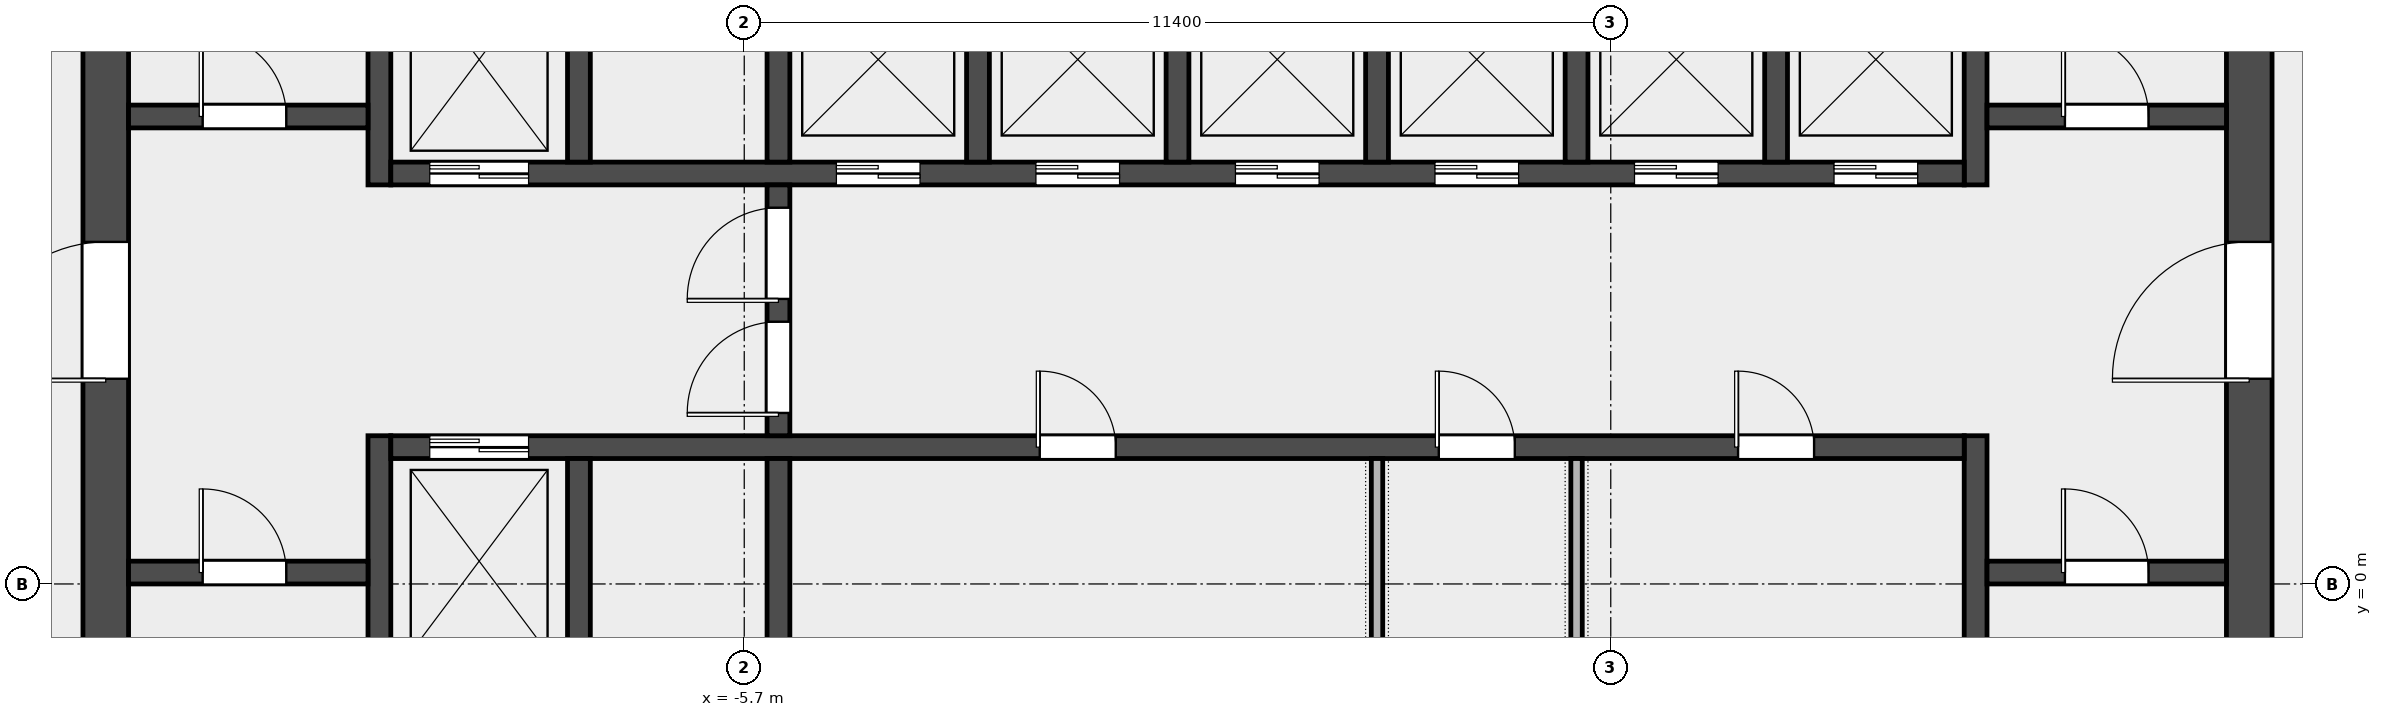
"""IFC4 building model, lengths in metres.
Left out: names, types, materials, properties, quantities, classifications, styles, units other than length and angle.
Written with IfcOpenShell. Run it as: python <this file> out.ifc"""

import sys

from ifc_helpers import new_model, si_unit, direction, frame, frame_2d, origin, place, context, subcontext, project, spatial, rectangle, extrude, element, fill, save


model = new_model("IFC4")
c1 = context("Model", 3, precision=1e-05, world=origin(), true_north=direction((0.0, 1.0)))
c2 = subcontext(c1, "Body", "Model", "MODEL_VIEW")
j1 = project(units=[si_unit("LENGTHUNIT", "METRE"), si_unit("PLANEANGLEUNIT", "RADIAN")], contexts=[c1])
p1 = place(None, origin())
s1 = spatial("IfcSite", under=j1, at=p1, CompositionType="ELEMENT")
p2 = place(p1, origin())
s2 = spatial("IfcBuilding", under=s1, at=p2, CompositionType="ELEMENT")
p3 = place(p2, frame((0.0, 0.0, 337.4)))
s3 = spatial("IfcBuildingStorey", under=s2, at=p3, CompositionType="ELEMENT", Elevation=337.4)
p4 = place(p3, frame((-14.1, -6.6, 0.0), z_axis=(0.0, 0.0, 1.0), x_axis=(0.0, 1.0, 0.0)))
e1 = element("IfcWall", 1, at=p4, inside=s3, PredefinedType="SHEAR", context=c2, shape_type="SweptSolid", body=[
    extrude(rectangle(XDim=19.5, YDim=0.6, at=frame_2d((9.75, 0.0))), origin(), (0.0, 0.0, 1.0), 7.7),
])
p5 = place(p4, frame((9.3, 0.0, 0.0)))
e2 = element("IfcOpeningElement", 2, at=p5, cuts=e1, PredefinedType="OPENING", context=c2, shape_type="SweptSolid", body=[
    extrude(rectangle(XDim=1.8, YDim=2.1, at=frame_2d((0.9, 1.05))), frame((0.0, 0.312, 0.0), z_axis=(0.0, -1.0, 0.0), x_axis=(1.0, 0.0, 0.0)), (0.0, 0.0, 1.0), 0.624),
])
p6 = place(p3, frame((14.1, -6.6, 0.0), z_axis=(0.0, 0.0, 1.0), x_axis=(0.0, 1.0, 0.0)))
e3 = element("IfcWall", 3, at=p6, inside=s3, PredefinedType="SHEAR", context=c2, shape_type="SweptSolid", body=[
    extrude(rectangle(XDim=19.5, YDim=0.6, at=frame_2d((9.75, 0.0))), origin(), (0.0, 0.0, 1.0), 7.7),
])
p7 = place(p6, frame((9.3, 0.0, 0.0)))
e4 = element("IfcOpeningElement", 4, at=p7, cuts=e3, PredefinedType="OPENING", context=c2, shape_type="SweptSolid", body=[
    extrude(rectangle(XDim=1.8, YDim=2.1, at=frame_2d((0.9, 1.05))), frame((0.0, 0.312, 0.0), z_axis=(0.0, -1.0, 0.0), x_axis=(1.0, 0.0, 0.0)), (0.0, 0.0, 1.0), 0.624),
])
p8 = place(p3, frame((-10.5, -6.6, 0.0), z_axis=(0.0, 0.0, 1.0), x_axis=(0.0, 1.0, 0.0)))
e5 = element("IfcWall", 5, at=p8, inside=s3, PredefinedType="SHEAR", context=c2, shape_type="SweptSolid", body=[
    extrude(rectangle(XDim=8.55, YDim=0.3, at=frame_2d((4.275, 0.0))), origin(), (0.0, 0.0, 1.0), 7.7),
])
p9 = place(p3, frame((-10.5, 5.25, 0.0), z_axis=(0.0, 0.0, 1.0), x_axis=(0.0, 1.0, 0.0)))
e6 = element("IfcWall", 6, at=p9, inside=s3, PredefinedType="SHEAR", context=c2, shape_type="SweptSolid", body=[
    extrude(rectangle(XDim=7.65, YDim=0.3, at=frame_2d((3.825, 0.0))), origin(), (0.0, 0.0, 1.0), 7.7),
])
p10 = place(p3, frame((10.5, -6.6, 0.0), z_axis=(0.0, 0.0, 1.0), x_axis=(0.0, 1.0, 0.0)))
e7 = element("IfcWall", 7, at=p10, inside=s3, PredefinedType="SHEAR", context=c2, shape_type="SweptSolid", body=[
    extrude(rectangle(XDim=8.55, YDim=0.3, at=frame_2d((4.275, 0.0))), origin(), (0.0, 0.0, 1.0), 7.7),
])
p11 = place(p3, frame((10.5, 5.25, 0.0), z_axis=(0.0, 0.0, 1.0), x_axis=(0.0, 1.0, 0.0)))
e8 = element("IfcWall", 8, at=p11, inside=s3, PredefinedType="SHEAR", context=c2, shape_type="SweptSolid", body=[
    extrude(rectangle(XDim=7.65, YDim=0.3, at=frame_2d((3.825, 0.0))), origin(), (0.0, 0.0, 1.0), 7.7),
])
p12 = place(p3, frame((-13.8, 0.15, 0.0), z_axis=(0.0, 0.0, 1.0), x_axis=(1.0, 0.0, 0.0)))
e9 = element("IfcWall", 9, at=p12, inside=s3, PredefinedType="SOLIDWALL", context=c2, shape_type="SweptSolid", body=[
    extrude(rectangle(XDim=3.15, YDim=0.3, at=frame_2d((1.575, 0.0))), origin(), (0.0, 0.0, 1.0), 7.7),
])
p13 = place(p12, frame((0.975, 0.0, 0.0)))
e10 = element("IfcOpeningElement", 10, at=p13, cuts=e9, PredefinedType="OPENING", context=c2, shape_type="SweptSolid", body=[
    extrude(rectangle(XDim=1.1, YDim=2.1, at=frame_2d((0.55, 1.05))), frame((0.0, 0.162, 0.0), z_axis=(0.0, -1.0, 0.0), x_axis=(1.0, 0.0, 0.0)), (0.0, 0.0, 1.0), 0.324),
])
p14 = place(p3, frame((-13.8, 6.15, 0.0), z_axis=(0.0, 0.0, 1.0), x_axis=(1.0, 0.0, 0.0)))
e11 = element("IfcWall", 11, at=p14, inside=s3, PredefinedType="SOLIDWALL", context=c2, shape_type="SweptSolid", body=[
    extrude(rectangle(XDim=3.15, YDim=0.3, at=frame_2d((1.575, 0.0))), origin(), (0.0, 0.0, 1.0), 7.7),
])
p15 = place(p14, frame((0.975, 0.0, 0.0)))
e12 = element("IfcOpeningElement", 12, at=p15, cuts=e11, PredefinedType="OPENING", context=c2, shape_type="SweptSolid", body=[
    extrude(rectangle(XDim=1.1, YDim=2.1, at=frame_2d((0.55, 1.05))), frame((0.0, 0.162, 0.0), z_axis=(0.0, -1.0, 0.0), x_axis=(1.0, 0.0, 0.0)), (0.0, 0.0, 1.0), 0.324),
])
p16 = place(p3, frame((10.65, 0.15, 0.0), z_axis=(0.0, 0.0, 1.0), x_axis=(1.0, 0.0, 0.0)))
e13 = element("IfcWall", 13, at=p16, inside=s3, PredefinedType="SOLIDWALL", context=c2, shape_type="SweptSolid", body=[
    extrude(rectangle(XDim=3.15, YDim=0.3, at=frame_2d((1.575, 0.0))), origin(), (0.0, 0.0, 1.0), 7.7),
])
p17 = place(p16, frame((1.025, 0.0, 0.0)))
e14 = element("IfcOpeningElement", 14, at=p17, cuts=e13, PredefinedType="OPENING", context=c2, shape_type="SweptSolid", body=[
    extrude(rectangle(XDim=1.1, YDim=2.1, at=frame_2d((0.55, 1.05))), frame((0.0, 0.162, 0.0), z_axis=(0.0, -1.0, 0.0), x_axis=(1.0, 0.0, 0.0)), (0.0, 0.0, 1.0), 0.324),
])
p18 = place(p3, frame((10.65, 6.15, 0.0), z_axis=(0.0, 0.0, 1.0), x_axis=(1.0, 0.0, 0.0)))
e15 = element("IfcWall", 15, at=p18, inside=s3, PredefinedType="SOLIDWALL", context=c2, shape_type="SweptSolid", body=[
    extrude(rectangle(XDim=3.15, YDim=0.3, at=frame_2d((1.575, 0.0))), origin(), (0.0, 0.0, 1.0), 7.7),
])
p19 = place(p18, frame((1.025, 0.0, 0.0)))
e16 = element("IfcOpeningElement", 16, at=p19, cuts=e15, PredefinedType="OPENING", context=c2, shape_type="SweptSolid", body=[
    extrude(rectangle(XDim=1.1, YDim=2.1, at=frame_2d((0.55, 1.05))), frame((0.0, 0.162, 0.0), z_axis=(0.0, -1.0, 0.0), x_axis=(1.0, 0.0, 0.0)), (0.0, 0.0, 1.0), 0.324),
])
p20 = place(p3, frame((-10.35, 1.8, 0.0), z_axis=(0.0, 0.0, 1.0), x_axis=(1.0, 0.0, 0.0)))
e17 = element("IfcWall", 17, at=p20, inside=s3, PredefinedType="SOLIDWALL", context=c2, shape_type="SweptSolid", body=[
    extrude(rectangle(XDim=20.7, YDim=0.3, at=frame_2d((10.35, 0.0))), origin(), (0.0, 0.0, 1.0), 7.7),
])
p21 = place(p20, frame((0.512, 0.0, 0.0)))
e18 = element("IfcOpeningElement", 18, at=p21, cuts=e17, PredefinedType="OPENING", context=c2, shape_type="SweptSolid", body=[
    extrude(rectangle(XDim=1.3, YDim=2.1, at=frame_2d((0.65, 1.05))), frame((0.0, 0.162, 0.0), z_axis=(0.0, -1.0, 0.0), x_axis=(1.0, 0.0, 0.0)), (0.0, 0.0, 1.0), 0.324),
])
p22 = place(p20, frame((8.538, 0.0, 0.0)))
e19 = element("IfcOpeningElement", 19, at=p22, cuts=e17, PredefinedType="OPENING", context=c2, shape_type="SweptSolid", body=[
    extrude(rectangle(XDim=1.0, YDim=2.1, at=frame_2d((0.5, 1.05))), frame((0.0, 0.162, 0.0), z_axis=(0.0, -1.0, 0.0), x_axis=(1.0, 0.0, 0.0)), (0.0, 0.0, 1.0), 0.324),
])
p23 = place(p20, frame((13.788, 0.0, 0.0)))
e20 = element("IfcOpeningElement", 20, at=p23, cuts=e17, PredefinedType="OPENING", context=c2, shape_type="SweptSolid", body=[
    extrude(rectangle(XDim=1.0, YDim=2.1, at=frame_2d((0.5, 1.05))), frame((0.0, 0.162, 0.0), z_axis=(0.0, -1.0, 0.0), x_axis=(1.0, 0.0, 0.0)), (0.0, 0.0, 1.0), 0.324),
])
p24 = place(p20, frame((17.725, 0.0, 0.0)))
e21 = element("IfcOpeningElement", 21, at=p24, cuts=e17, PredefinedType="OPENING", context=c2, shape_type="SweptSolid", body=[
    extrude(rectangle(XDim=1.0, YDim=2.1, at=frame_2d((0.5, 1.05))), frame((0.0, 0.162, 0.0), z_axis=(0.0, -1.0, 0.0), x_axis=(1.0, 0.0, 0.0)), (0.0, 0.0, 1.0), 0.324),
])
p25 = place(p3, frame((-10.35, 5.4, 0.0), z_axis=(0.0, 0.0, 1.0), x_axis=(1.0, 0.0, 0.0)))
e22 = element("IfcWall", 22, at=p25, inside=s3, PredefinedType="SOLIDWALL", context=c2, shape_type="SweptSolid", body=[
    extrude(rectangle(XDim=20.7, YDim=0.3, at=frame_2d((10.35, 0.0))), origin(), (0.0, 0.0, 1.0), 7.7),
])
p26 = place(p25, frame((0.512, 0.0, 0.0)))
e23 = element("IfcOpeningElement", 23, at=p26, cuts=e22, PredefinedType="OPENING", context=c2, shape_type="SweptSolid", body=[
    extrude(rectangle(XDim=1.3, YDim=2.1, at=frame_2d((0.65, 1.05))), frame((0.0, 0.162, 0.0), z_axis=(0.0, -1.0, 0.0), x_axis=(1.0, 0.0, 0.0)), (0.0, 0.0, 1.0), 0.324),
])
p27 = place(p25, frame((5.863, 0.0, 0.0)))
e24 = element("IfcOpeningElement", 24, at=p27, cuts=e22, PredefinedType="OPENING", context=c2, shape_type="SweptSolid", body=[
    extrude(rectangle(XDim=1.1, YDim=2.1, at=frame_2d((0.55, 1.05))), frame((0.0, 0.162, 0.0), z_axis=(0.0, -1.0, 0.0), x_axis=(1.0, 0.0, 0.0)), (0.0, 0.0, 1.0), 0.324),
])
p28 = place(p25, frame((8.488, 0.0, 0.0)))
e25 = element("IfcOpeningElement", 25, at=p28, cuts=e22, PredefinedType="OPENING", context=c2, shape_type="SweptSolid", body=[
    extrude(rectangle(XDim=1.1, YDim=2.1, at=frame_2d((0.55, 1.05))), frame((0.0, 0.162, 0.0), z_axis=(0.0, -1.0, 0.0), x_axis=(1.0, 0.0, 0.0)), (0.0, 0.0, 1.0), 0.324),
])
p29 = place(p25, frame((11.113, 0.0, 0.0)))
e26 = element("IfcOpeningElement", 26, at=p29, cuts=e22, PredefinedType="OPENING", context=c2, shape_type="SweptSolid", body=[
    extrude(rectangle(XDim=1.1, YDim=2.1, at=frame_2d((0.55, 1.05))), frame((0.0, 0.162, 0.0), z_axis=(0.0, -1.0, 0.0), x_axis=(1.0, 0.0, 0.0)), (0.0, 0.0, 1.0), 0.324),
])
p30 = place(p25, frame((13.738, 0.0, 0.0)))
e27 = element("IfcOpeningElement", 27, at=p30, cuts=e22, PredefinedType="OPENING", context=c2, shape_type="SweptSolid", body=[
    extrude(rectangle(XDim=1.1, YDim=2.1, at=frame_2d((0.55, 1.05))), frame((0.0, 0.162, 0.0), z_axis=(0.0, -1.0, 0.0), x_axis=(1.0, 0.0, 0.0)), (0.0, 0.0, 1.0), 0.324),
])
p31 = place(p25, frame((16.363, 0.0, 0.0)))
e28 = element("IfcOpeningElement", 28, at=p31, cuts=e22, PredefinedType="OPENING", context=c2, shape_type="SweptSolid", body=[
    extrude(rectangle(XDim=1.1, YDim=2.1, at=frame_2d((0.55, 1.05))), frame((0.0, 0.162, 0.0), z_axis=(0.0, -1.0, 0.0), x_axis=(1.0, 0.0, 0.0)), (0.0, 0.0, 1.0), 0.324),
])
p32 = place(p25, frame((18.988, 0.0, 0.0)))
e29 = element("IfcOpeningElement", 29, at=p32, cuts=e22, PredefinedType="OPENING", context=c2, shape_type="SweptSolid", body=[
    extrude(rectangle(XDim=1.1, YDim=2.1, at=frame_2d((0.55, 1.05))), frame((0.0, 0.162, 0.0), z_axis=(0.0, -1.0, 0.0), x_axis=(1.0, 0.0, 0.0)), (0.0, 0.0, 1.0), 0.324),
])
for number, where, z_axis, x_axis in (
    (30, (-7.875, -1.05, 0.0), (0.0, 0.0, 1.0), (0.0, 1.0, 0.0)),
    (31, (-5.25, -1.05, 0.0), (0.0, 0.0, 1.0), (0.0, 1.0, 0.0)),
    (32, (-7.875, 5.55, 0.0), (0.0, 0.0, 1.0), (0.0, 1.0, 0.0)),
    (33, (-5.25, 5.55, 0.0), (0.0, 0.0, 1.0), (0.0, 1.0, 0.0)),
    (34, (-2.625, 5.55, 0.0), (0.0, 0.0, 1.0), (0.0, 1.0, 0.0)),
    (35, (0.0, 5.55, 0.0), (0.0, 0.0, 1.0), (0.0, 1.0, 0.0)),
    (36, (2.625, 5.55, 0.0), (0.0, 0.0, 1.0), (0.0, 1.0, 0.0)),
    (37, (5.25, 5.55, 0.0), (0.0, 0.0, 1.0), (0.0, 1.0, 0.0)),
    (38, (7.875, 5.55, 0.0), (0.0, 0.0, 1.0), (0.0, 1.0, 0.0)),
):
    element("IfcWall", number, at=place(p3, frame(where, z_axis=z_axis, x_axis=x_axis)), inside=s3, PredefinedType="SOLIDWALL", context=c2, shape_type="SweptSolid", body=[
        extrude(rectangle(XDim=2.7, YDim=0.3, at=frame_2d((1.35, 0.0))), origin(), (0.0, 0.0, 1.0), 7.7),
    ])
p33 = place(p3, frame((-5.25, 1.95, 0.0), z_axis=(0.0, 0.0, 1.0), x_axis=(0.0, 1.0, 0.0)))
e39 = element("IfcWall", 39, at=p33, inside=s3, PredefinedType="SOLIDWALL", context=c2, shape_type="SweptSolid", body=[
    extrude(rectangle(XDim=3.3, YDim=0.3, at=frame_2d((1.65, 0.0))), origin(), (0.0, 0.0, 1.0), 7.7),
])
p34 = place(p33, frame((0.3, 0.0, 0.0)))
e40 = element("IfcOpeningElement", 40, at=p34, cuts=e39, PredefinedType="OPENING", context=c2, shape_type="SweptSolid", body=[
    extrude(rectangle(XDim=1.2, YDim=2.1, at=frame_2d((0.6, 1.05))), frame((0.0, 0.162, 0.0), z_axis=(0.0, -1.0, 0.0), x_axis=(1.0, 0.0, 0.0)), (0.0, 0.0, 1.0), 0.324),
])
p35 = place(p33, frame((1.8, 0.0, 0.0)))
e41 = element("IfcOpeningElement", 41, at=p35, cuts=e39, PredefinedType="OPENING", context=c2, shape_type="SweptSolid", body=[
    extrude(rectangle(XDim=1.2, YDim=2.1, at=frame_2d((0.6, 1.05))), frame((0.0, 0.162, 0.0), z_axis=(0.0, -1.0, 0.0), x_axis=(1.0, 0.0, 0.0)), (0.0, 0.0, 1.0), 0.324),
])
for number, where, z_axis, x_axis in (
    (42, (2.625, -1.05, 0.0), (0.0, 0.0, 1.0), (0.0, 1.0, 0.0)),
    (43, (5.25, -1.05, 0.0), (0.0, 0.0, 1.0), (0.0, 1.0, 0.0)),
):
    element("IfcWall", number, at=place(p3, frame(where, z_axis=z_axis, x_axis=x_axis)), inside=s3, PredefinedType="PARTITIONING", context=c2, shape_type="SweptSolid", body=[
        extrude(rectangle(XDim=2.7, YDim=0.15, at=frame_2d((1.35, 0.0))), origin(), (0.0, 0.0, 1.0), 7.7),
    ])
p36 = place(p13, origin())
e44 = element("IfcDoor", 44, at=p36, inside=s3, OperationType="SINGLE_SWING_LEFT", PredefinedType="DOOR", context=c2, shape_type="SweptSolid", body=[
    extrude(rectangle(XDim=1.1, YDim=2.1, at=frame_2d((0.55, 1.05))), frame((0.0, 0.025, 0.0), z_axis=(0.0, -1.0, 0.0), x_axis=(1.0, 0.0, 0.0)), (0.0, 0.0, 1.0), 0.05),
])
fill(e10, e44)
p37 = place(p15, origin())
e45 = element("IfcDoor", 45, at=p37, inside=s3, OperationType="SINGLE_SWING_LEFT", PredefinedType="DOOR", context=c2, shape_type="SweptSolid", body=[
    extrude(rectangle(XDim=1.1, YDim=2.1, at=frame_2d((0.55, 1.05))), frame((0.0, 0.025, 0.0), z_axis=(0.0, -1.0, 0.0), x_axis=(1.0, 0.0, 0.0)), (0.0, 0.0, 1.0), 0.05),
])
fill(e12, e45)
p38 = place(p17, origin())
e46 = element("IfcDoor", 46, at=p38, inside=s3, OperationType="SINGLE_SWING_RIGHT", PredefinedType="DOOR", context=c2, shape_type="SweptSolid", body=[
    extrude(rectangle(XDim=1.1, YDim=2.1, at=frame_2d((0.55, 1.05))), frame((0.0, 0.025, 0.0), z_axis=(0.0, -1.0, 0.0), x_axis=(1.0, 0.0, 0.0)), (0.0, 0.0, 1.0), 0.05),
])
fill(e14, e46)
p39 = place(p19, origin())
e47 = element("IfcDoor", 47, at=p39, inside=s3, OperationType="SINGLE_SWING_RIGHT", PredefinedType="DOOR", context=c2, shape_type="SweptSolid", body=[
    extrude(rectangle(XDim=1.1, YDim=2.1, at=frame_2d((0.55, 1.05))), frame((0.0, 0.025, 0.0), z_axis=(0.0, -1.0, 0.0), x_axis=(1.0, 0.0, 0.0)), (0.0, 0.0, 1.0), 0.05),
])
fill(e16, e47)
p40 = place(p5, origin())
e48 = element("IfcDoor", 48, at=p40, inside=s3, OperationType="DOUBLE_DOOR_SINGLE_SWING", PredefinedType="DOOR", context=c2, shape_type="SweptSolid", body=[
    extrude(rectangle(XDim=1.8, YDim=2.1, at=frame_2d((0.9, 1.05))), frame((0.0, 0.025, 0.0), z_axis=(0.0, -1.0, 0.0), x_axis=(1.0, 0.0, 0.0)), (0.0, 0.0, 1.0), 0.05),
])
fill(e2, e48)
p41 = place(p7, origin())
e49 = element("IfcDoor", 49, at=p41, inside=s3, OperationType="DOUBLE_DOOR_SINGLE_SWING", PredefinedType="DOOR", context=c2, shape_type="SweptSolid", body=[
    extrude(rectangle(XDim=1.8, YDim=2.1, at=frame_2d((0.9, 1.05))), frame((0.0, 0.025, 0.0), z_axis=(0.0, -1.0, 0.0), x_axis=(1.0, 0.0, 0.0)), (0.0, 0.0, 1.0), 0.05),
])
fill(e4, e49)
p42 = place(p34, origin())
e50 = element("IfcDoor", 50, at=p42, inside=s3, OperationType="SINGLE_SWING_LEFT", PredefinedType="DOOR", context=c2, shape_type="SweptSolid", body=[
    extrude(rectangle(XDim=1.2, YDim=2.1, at=frame_2d((0.6, 1.05))), frame((0.0, 0.025, 0.0), z_axis=(0.0, -1.0, 0.0), x_axis=(1.0, 0.0, 0.0)), (0.0, 0.0, 1.0), 0.05),
])
fill(e40, e50)
p43 = place(p35, origin())
e51 = element("IfcDoor", 51, at=p43, inside=s3, OperationType="SINGLE_SWING_RIGHT", PredefinedType="DOOR", context=c2, shape_type="SweptSolid", body=[
    extrude(rectangle(XDim=1.2, YDim=2.1, at=frame_2d((0.6, 1.05))), frame((0.0, 0.025, 0.0), z_axis=(0.0, -1.0, 0.0), x_axis=(1.0, 0.0, 0.0)), (0.0, 0.0, 1.0), 0.05),
])
fill(e41, e51)
p44 = place(p21, origin())
e52 = element("IfcDoor", 52, at=p44, inside=s3, OperationType="DOUBLE_DOOR_SLIDING", PredefinedType="DOOR", context=c2, shape_type="SweptSolid", body=[
    extrude(rectangle(XDim=1.3, YDim=2.1, at=frame_2d((0.65, 1.05))), frame((0.0, 0.025, 0.0), z_axis=(0.0, -1.0, 0.0), x_axis=(1.0, 0.0, 0.0)), (0.0, 0.0, 1.0), 0.05),
])
fill(e18, e52)
p45 = place(p26, origin())
e53 = element("IfcDoor", 53, at=p45, inside=s3, OperationType="DOUBLE_DOOR_SLIDING", PredefinedType="DOOR", context=c2, shape_type="SweptSolid", body=[
    extrude(rectangle(XDim=1.3, YDim=2.1, at=frame_2d((0.65, 1.05))), frame((0.0, 0.025, 0.0), z_axis=(0.0, -1.0, 0.0), x_axis=(1.0, 0.0, 0.0)), (0.0, 0.0, 1.0), 0.05),
])
fill(e23, e53)
p46 = place(p27, origin())
e54 = element("IfcDoor", 54, at=p46, inside=s3, OperationType="DOUBLE_DOOR_SLIDING", PredefinedType="DOOR", context=c2, shape_type="SweptSolid", body=[
    extrude(rectangle(XDim=1.1, YDim=2.1, at=frame_2d((0.55, 1.05))), frame((0.0, 0.025, 0.0), z_axis=(0.0, -1.0, 0.0), x_axis=(1.0, 0.0, 0.0)), (0.0, 0.0, 1.0), 0.05),
])
fill(e24, e54)
p47 = place(p28, origin())
e55 = element("IfcDoor", 55, at=p47, inside=s3, OperationType="DOUBLE_DOOR_SLIDING", PredefinedType="DOOR", context=c2, shape_type="SweptSolid", body=[
    extrude(rectangle(XDim=1.1, YDim=2.1, at=frame_2d((0.55, 1.05))), frame((0.0, 0.025, 0.0), z_axis=(0.0, -1.0, 0.0), x_axis=(1.0, 0.0, 0.0)), (0.0, 0.0, 1.0), 0.05),
])
fill(e25, e55)
p48 = place(p29, origin())
e56 = element("IfcDoor", 56, at=p48, inside=s3, OperationType="DOUBLE_DOOR_SLIDING", PredefinedType="DOOR", context=c2, shape_type="SweptSolid", body=[
    extrude(rectangle(XDim=1.1, YDim=2.1, at=frame_2d((0.55, 1.05))), frame((0.0, 0.025, 0.0), z_axis=(0.0, -1.0, 0.0), x_axis=(1.0, 0.0, 0.0)), (0.0, 0.0, 1.0), 0.05),
])
fill(e26, e56)
p49 = place(p30, origin())
e57 = element("IfcDoor", 57, at=p49, inside=s3, OperationType="DOUBLE_DOOR_SLIDING", PredefinedType="DOOR", context=c2, shape_type="SweptSolid", body=[
    extrude(rectangle(XDim=1.1, YDim=2.1, at=frame_2d((0.55, 1.05))), frame((0.0, 0.025, 0.0), z_axis=(0.0, -1.0, 0.0), x_axis=(1.0, 0.0, 0.0)), (0.0, 0.0, 1.0), 0.05),
])
fill(e27, e57)
p50 = place(p31, origin())
e58 = element("IfcDoor", 58, at=p50, inside=s3, OperationType="DOUBLE_DOOR_SLIDING", PredefinedType="DOOR", context=c2, shape_type="SweptSolid", body=[
    extrude(rectangle(XDim=1.1, YDim=2.1, at=frame_2d((0.55, 1.05))), frame((0.0, 0.025, 0.0), z_axis=(0.0, -1.0, 0.0), x_axis=(1.0, 0.0, 0.0)), (0.0, 0.0, 1.0), 0.05),
])
fill(e28, e58)
p51 = place(p32, origin())
e59 = element("IfcDoor", 59, at=p51, inside=s3, OperationType="DOUBLE_DOOR_SLIDING", PredefinedType="DOOR", context=c2, shape_type="SweptSolid", body=[
    extrude(rectangle(XDim=1.1, YDim=2.1, at=frame_2d((0.55, 1.05))), frame((0.0, 0.025, 0.0), z_axis=(0.0, -1.0, 0.0), x_axis=(1.0, 0.0, 0.0)), (0.0, 0.0, 1.0), 0.05),
])
fill(e29, e59)
p52 = place(p22, origin())
e60 = element("IfcDoor", 60, at=p52, inside=s3, OperationType="SINGLE_SWING_LEFT", PredefinedType="DOOR", context=c2, shape_type="SweptSolid", body=[
    extrude(rectangle(XDim=1.0, YDim=2.1, at=frame_2d((0.5, 1.05))), frame((0.0, 0.025, 0.0), z_axis=(0.0, -1.0, 0.0), x_axis=(1.0, 0.0, 0.0)), (0.0, 0.0, 1.0), 0.05),
])
fill(e19, e60)
p53 = place(p23, origin())
e61 = element("IfcDoor", 61, at=p53, inside=s3, OperationType="SINGLE_SWING_LEFT", PredefinedType="DOOR", context=c2, shape_type="SweptSolid", body=[
    extrude(rectangle(XDim=1.0, YDim=2.1, at=frame_2d((0.5, 1.05))), frame((0.0, 0.025, 0.0), z_axis=(0.0, -1.0, 0.0), x_axis=(1.0, 0.0, 0.0)), (0.0, 0.0, 1.0), 0.05),
])
fill(e20, e61)
p54 = place(p24, origin())
e62 = element("IfcDoor", 62, at=p54, inside=s3, OperationType="SINGLE_SWING_LEFT", PredefinedType="DOOR", context=c2, shape_type="SweptSolid", body=[
    extrude(rectangle(XDim=1.0, YDim=2.1, at=frame_2d((0.5, 1.05))), frame((0.0, 0.025, 0.0), z_axis=(0.0, -1.0, 0.0), x_axis=(1.0, 0.0, 0.0)), (0.0, 0.0, 1.0), 0.05),
])
fill(e21, e62)
save(model, sys.argv[1])
